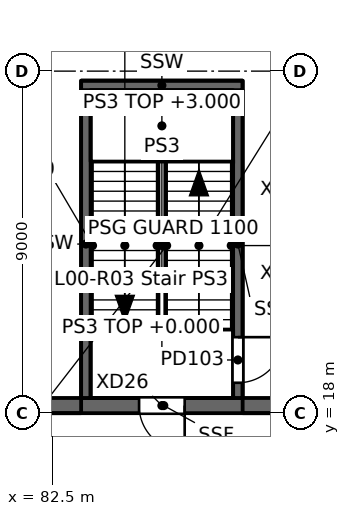
"""IFC4 building model, lengths in metres.
Left out: names, types, materials, properties, quantities, classifications, styles, units other than length and angle.
Written with IfcOpenShell. Run it as: python <this file> out.ifc"""

import sys

from ifc_helpers import new_model, si_unit, direction, frame, frame_2d, origin, place, context, subcontext, project, spatial, rectangle, extrude, element, fill, save


model = new_model("IFC4")
c1 = context("Model", 3, precision=1e-05, world=origin(), true_north=direction((0.0, 1.0)))
c2 = subcontext(c1, "Body", "Model", "MODEL_VIEW")
j1 = project(units=[si_unit("LENGTHUNIT", "METRE"), si_unit("PLANEANGLEUNIT", "RADIAN")], contexts=[c1])
p1 = place(None, origin())
s1 = spatial("IfcSite", under=j1, at=p1, CompositionType="ELEMENT")
p2 = place(p1, origin())
s2 = spatial("IfcBuilding", under=s1, at=p2, CompositionType="ELEMENT")
p3 = place(p2, origin())
s3 = spatial("IfcBuildingStorey", under=s2, at=p3, CompositionType="ELEMENT", Elevation=0.0)
p4 = place(p3, frame((83.375, 18.4, 0.0), z_axis=(0.0, 0.0, 1.0), x_axis=(0.0, 1.0, 0.0)))
e1 = element("IfcWall", 1, at=p4, inside=s3, PredefinedType="SOLIDWALL", context=c2, shape_type="SweptSolid", body=[
    extrude(rectangle(XDim=8.1, YDim=0.25, at=frame_2d((4.05, 0.0))), origin(), (0.0, 0.0, 1.0), 6.0),
])
p5 = place(p3, frame((87.375, 26.5, 0.0), z_axis=(0.0, 0.0, 1.0), x_axis=(0.0, -1.0, 0.0)))
e2 = element("IfcWall", 2, at=p5, inside=s3, PredefinedType="SOLIDWALL", context=c2, shape_type="SweptSolid", body=[
    extrude(rectangle(XDim=8.1, YDim=0.25, at=frame_2d((4.05, 0.0))), origin(), (0.0, 0.0, 1.0), 6.0),
])
p6 = place(p5, frame((6.5, 0.0, 0.0)))
e3 = element("IfcOpeningElement", 3, at=p6, cuts=e2, PredefinedType="OPENING", context=c2, shape_type="SweptSolid", body=[
    extrude(rectangle(XDim=1.2, YDim=2.1, at=frame_2d((0.6, 1.05))), frame((0.0, 0.125, 0.0), z_axis=(0.0, -1.0, 0.0), x_axis=(1.0, 0.0, 0.0)), (0.0, 0.0, 1.0), 0.25),
])
p7 = place(p3, frame((83.25, 26.625, 0.0), z_axis=(0.0, 0.0, 1.0), x_axis=(1.0, 0.0, 0.0)))
e4 = element("IfcWall", 4, at=p7, inside=s3, PredefinedType="SOLIDWALL", context=c2, shape_type="SweptSolid", body=[
    extrude(rectangle(XDim=4.25, YDim=0.25, at=frame_2d((2.125, 0.0))), origin(), (0.0, 0.0, 1.0), 6.0),
])
p8 = place(p3, frame((89.1, 18.2, 0.0), z_axis=(0.0, 0.0, 1.0), x_axis=(-1.0, 0.0, 0.0)))
e5 = element("IfcWall", 5, at=p8, inside=s3, PredefinedType="SOLIDWALL", context=c2, shape_type="SweptSolid", body=[
    extrude(rectangle(XDim=7.35, YDim=0.4, at=frame_2d((3.675, 0.0))), origin(), (0.0, 0.0, 1.0), 5.65),
])
p9 = place(p8, frame((3.125, 0.0, 0.0)))
e6 = element("IfcOpeningElement", 6, at=p9, cuts=e5, PredefinedType="OPENING", context=c2, shape_type="SweptSolid", body=[
    extrude(rectangle(XDim=1.2, YDim=2.1, at=frame_2d((0.6, 1.05))), frame((0.0, 0.2, 0.0), z_axis=(0.0, -1.0, 0.0), x_axis=(1.0, 0.0, 0.0)), (0.0, 0.0, 1.0), 0.4),
])
p10 = place(p6, origin())
e7 = element("IfcDoor", 7, at=p10, inside=s3, OperationType="SINGLE_SWING_LEFT", PredefinedType="DOOR", context=c2, shape_type="SweptSolid", body=[
    extrude(rectangle(XDim=1.2, YDim=2.1, at=frame_2d((0.6, 1.05))), frame((0.0, 0.025, 0.0), z_axis=(0.0, -1.0, 0.0), x_axis=(1.0, 0.0, 0.0)), (0.0, 0.0, 1.0), 0.05),
])
fill(e3, e7)
p11 = place(p9, origin())
e8 = element("IfcDoor", 8, at=p11, inside=s3, OperationType="SINGLE_SWING_LEFT", PredefinedType="DOOR", context=c2, shape_type="SweptSolid", body=[
    extrude(rectangle(XDim=1.2, YDim=2.1, at=frame_2d((0.6, 1.05))), frame((0.0, 0.025, 0.0), z_axis=(0.0, -1.0, 0.0), x_axis=(1.0, 0.0, 0.0)), (0.0, 0.0, 1.0), 0.05),
])
fill(e6, e8)
save(model, sys.argv[1])
